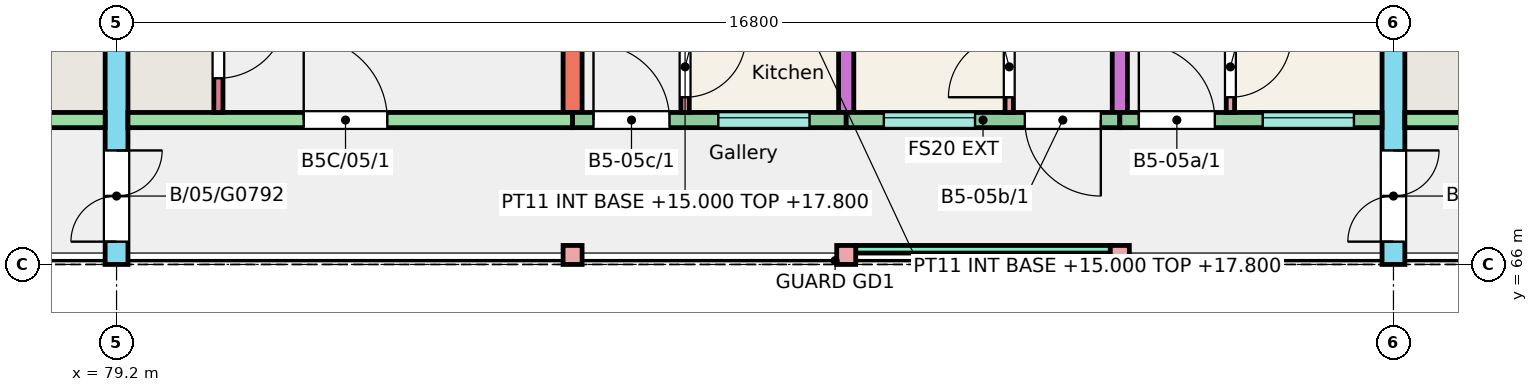
"""IFC4 building model, lengths in metres.
Left out: names, types, materials, properties, quantities, classifications, styles, units other than length and angle.
Written with IfcOpenShell. Run it as: python <this file> out.ifc"""

import sys

from ifc_helpers import new_model, si_unit, direction, frame, frame_2d, origin, origin_2d, place, context, subcontext, project, spatial, rectangle, extrude, element, fill, save


model = new_model("IFC4")
c1 = context("Model", 3, precision=1e-05, world=origin(), true_north=direction((0.0, 1.0)))
c2 = subcontext(c1, "Body", "Model", "MODEL_VIEW")
j1 = project(units=[si_unit("LENGTHUNIT", "METRE"), si_unit("PLANEANGLEUNIT", "RADIAN")], contexts=[c1])
p1 = place(None, origin())
s1 = spatial("IfcSite", under=j1, at=p1, CompositionType="ELEMENT")
p2 = place(p1, origin())
s2 = spatial("IfcBuilding", under=s1, at=p2, CompositionType="ELEMENT")
p3 = place(p2, frame((0.0, 0.0, 15.0)))
s3 = spatial("IfcBuildingStorey", under=s2, at=p3, CompositionType="ELEMENT", Elevation=15.0)
p4 = place(p3, frame((79.2, 66.0, 0.0), z_axis=(0.0, 0.0, 1.0), x_axis=(0.0, 1.0, 0.0)))
e1 = element("IfcWall", 1, at=p4, inside=s3, PredefinedType="SHEAR", context=c2, shape_type="SweptSolid", body=[
    extrude(rectangle(XDim=11.0, YDim=0.3, at=frame_2d((5.5, 0.0))), origin(), (0.0, 0.0, 1.0), 3.0),
])
p5 = place(p4, frame((0.3, 0.0, 0.0)))
e2 = element("IfcOpeningElement", 2, at=p5, cuts=e1, PredefinedType="OPENING", context=c2, shape_type="SweptSolid", body=[
    extrude(rectangle(XDim=1.2, YDim=2.1, at=frame_2d((0.6, 1.05))), frame((0.0, 0.16, 0.0), z_axis=(0.0, -1.0, 0.0), x_axis=(1.0, 0.0, 0.0)), (0.0, 0.0, 1.0), 0.32),
])
p6 = place(p3, frame((85.2, 68.0, 0.0), z_axis=(0.0, 0.0, 1.0), x_axis=(0.0, 1.0, 0.0)))
e3 = element("IfcWall", 3, at=p6, inside=s3, PredefinedType="SHEAR", context=c2, shape_type="SweptSolid", body=[
    extrude(rectangle(XDim=9.0, YDim=0.25, at=frame_2d((4.5, 0.0))), origin(), (0.0, 0.0, 1.0), 3.0),
])
for number, where, z_axis, x_axis in (
    (4, (88.8, 68.0, 0.0), (0.0, 0.0, 1.0), (0.0, 1.0, 0.0)),
    (5, (92.4, 68.0, 0.0), (0.0, 0.0, 1.0), (0.0, 1.0, 0.0)),
):
    element("IfcWall", number, at=place(p3, frame(where, z_axis=z_axis, x_axis=x_axis)), inside=s3, PredefinedType="SHEAR", context=c2, shape_type="SweptSolid", body=[
        extrude(rectangle(XDim=9.0, YDim=0.2, at=frame_2d((4.5, 0.0))), origin(), (0.0, 0.0, 1.0), 3.0),
    ])
p7 = place(p3, frame((96.0, 66.0, 0.0), z_axis=(0.0, 0.0, 1.0), x_axis=(0.0, 1.0, 0.0)))
e6 = element("IfcWall", 6, at=p7, inside=s3, PredefinedType="SHEAR", context=c2, shape_type="SweptSolid", body=[
    extrude(rectangle(XDim=11.0, YDim=0.3, at=frame_2d((5.5, 0.0))), origin(), (0.0, 0.0, 1.0), 3.0),
])
p8 = place(p7, frame((0.3, 0.0, 0.0)))
e7 = element("IfcOpeningElement", 7, at=p8, cuts=e6, PredefinedType="OPENING", context=c2, shape_type="SweptSolid", body=[
    extrude(rectangle(XDim=1.2, YDim=2.1, at=frame_2d((0.6, 1.05))), frame((0.0, 0.16, 0.0), z_axis=(0.0, -1.0, 0.0), x_axis=(1.0, 0.0, 0.0)), (0.0, 0.0, 1.0), 0.32),
])
p9 = place(p3, frame((73.2, 67.9, 0.0), z_axis=(0.0, 0.0, 1.0), x_axis=(1.0, 0.0, 0.0)))
e8 = element("IfcWall", 8, at=p9, inside=s3, PredefinedType="SHEAR", context=c2, shape_type="SweptSolid", body=[
    extrude(rectangle(XDim=5.85, YDim=0.2, at=frame_2d((2.925, 0.0))), origin(), (0.0, 0.0, 1.0), 3.0),
])
p10 = place(p9, frame((2.438, 0.0, 0.0)))
e9 = element("IfcOpeningElement", 9, at=p10, cuts=e8, PredefinedType="OPENING", context=c2, shape_type="SweptSolid", body=[
    extrude(rectangle(XDim=1.1, YDim=2.1, at=frame_2d((0.55, 1.05))), frame((0.0, 0.11, 0.0), z_axis=(0.0, -1.0, 0.0), x_axis=(1.0, 0.0, 0.0)), (0.0, 0.0, 1.0), 0.22),
])
p11 = place(p3, frame((79.35, 67.9, 0.0), z_axis=(0.0, 0.0, 1.0), x_axis=(1.0, 0.0, 0.0)))
e10 = element("IfcWall", 10, at=p11, inside=s3, PredefinedType="SHEAR", context=c2, shape_type="SweptSolid", body=[
    extrude(rectangle(XDim=5.85, YDim=0.2, at=frame_2d((2.925, 0.0))), origin(), (0.0, 0.0, 1.0), 3.0),
])
p12 = place(p11, frame((2.312, 0.0, 0.0)))
e11 = element("IfcOpeningElement", 11, at=p12, cuts=e10, PredefinedType="OPENING", context=c2, shape_type="SweptSolid", body=[
    extrude(rectangle(XDim=1.1, YDim=2.1, at=frame_2d((0.55, 1.05))), frame((0.0, 0.11, 0.0), z_axis=(0.0, -1.0, 0.0), x_axis=(1.0, 0.0, 0.0)), (0.0, 0.0, 1.0), 0.22),
])
p13 = place(p3, frame((80.54, 68.0, 0.0), z_axis=(0.0, 0.0, 1.0), x_axis=(0.0, 1.0, 0.0)))
e12 = element("IfcWall", 12, at=p13, inside=s3, PredefinedType="SHEAR", context=c2, shape_type="SweptSolid", body=[
    extrude(rectangle(XDim=1.72, YDim=0.12, at=frame_2d((0.86, 0.0))), origin(), (0.0, 0.0, 1.0), 3.0),
])
p14 = place(p13, frame((0.45, 0.0, 0.0)))
e13 = element("IfcOpeningElement", 13, at=p14, cuts=e12, PredefinedType="OPENING", context=c2, shape_type="SweptSolid", body=[
    extrude(rectangle(XDim=0.9, YDim=2.1, at=frame_2d((0.45, 1.05))), frame((0.0, 0.07, 0.0), z_axis=(0.0, -1.0, 0.0), x_axis=(1.0, 0.0, 0.0)), (0.0, 0.0, 1.0), 0.14),
])
p15 = place(p3, frame((85.2, 67.9, 0.0), z_axis=(0.0, 0.0, 1.0), x_axis=(1.0, 0.0, 0.0)))
e14 = element("IfcWall", 14, at=p15, inside=s3, PredefinedType="SOLIDWALL", context=c2, shape_type="SweptSolid", body=[
    extrude(rectangle(XDim=3.6, YDim=0.2, at=frame_2d((1.8, 0.0))), origin(), (0.0, 0.0, 1.0), 3.0),
])
p16 = place(p15, frame((1.917, 0.0, 1.1)))
e15 = element("IfcOpeningElement", 15, at=p16, cuts=e14, PredefinedType="OPENING", context=c2, shape_type="SweptSolid", body=[
    extrude(rectangle(XDim=1.2, YDim=1.3, at=frame_2d((0.6, 0.65))), frame((0.0, 0.11, 0.0), z_axis=(0.0, -1.0, 0.0), x_axis=(1.0, 0.0, 0.0)), (0.0, 0.0, 1.0), 0.22),
])
p17 = place(p15, frame((0.275, 0.0, 0.0)))
e16 = element("IfcOpeningElement", 16, at=p17, cuts=e14, PredefinedType="OPENING", context=c2, shape_type="SweptSolid", body=[
    extrude(rectangle(XDim=1.0, YDim=2.1, at=frame_2d((0.5, 1.05))), frame((0.0, 0.11, 0.0), z_axis=(0.0, -1.0, 0.0), x_axis=(1.0, 0.0, 0.0)), (0.0, 0.0, 1.0), 0.22),
])
p18 = place(p3, frame((88.8, 67.9, 0.0), z_axis=(0.0, 0.0, 1.0), x_axis=(1.0, 0.0, 0.0)))
e17 = element("IfcWall", 17, at=p18, inside=s3, PredefinedType="SOLIDWALL", context=c2, shape_type="SweptSolid", body=[
    extrude(rectangle(XDim=3.6, YDim=0.2, at=frame_2d((1.8, 0.0))), origin(), (0.0, 0.0, 1.0), 3.0),
])
p19 = place(p18, frame((0.495, 0.0, 1.1)))
e18 = element("IfcOpeningElement", 18, at=p19, cuts=e17, PredefinedType="OPENING", context=c2, shape_type="SweptSolid", body=[
    extrude(rectangle(XDim=1.2, YDim=1.3, at=frame_2d((0.6, 0.65))), frame((0.0, 0.11, 0.0), z_axis=(0.0, -1.0, 0.0), x_axis=(1.0, 0.0, 0.0)), (0.0, 0.0, 1.0), 0.22),
])
p20 = place(p18, frame((2.35, 0.0, 0.0)))
e19 = element("IfcOpeningElement", 19, at=p20, cuts=e17, PredefinedType="OPENING", context=c2, shape_type="SweptSolid", body=[
    extrude(rectangle(XDim=1.0, YDim=2.1, at=frame_2d((0.5, 1.05))), frame((0.0, 0.11, 0.0), z_axis=(0.0, -1.0, 0.0), x_axis=(1.0, 0.0, 0.0)), (0.0, 0.0, 1.0), 0.22),
])
p21 = place(p3, frame((92.4, 67.9, 0.0), z_axis=(0.0, 0.0, 1.0), x_axis=(1.0, 0.0, 0.0)))
e20 = element("IfcWall", 20, at=p21, inside=s3, PredefinedType="SOLIDWALL", context=c2, shape_type="SweptSolid", body=[
    extrude(rectangle(XDim=3.45, YDim=0.2, at=frame_2d((1.725, 0.0))), origin(), (0.0, 0.0, 1.0), 3.0),
])
p22 = place(p21, frame((1.88, 0.0, 1.1)))
e21 = element("IfcOpeningElement", 21, at=p22, cuts=e20, PredefinedType="OPENING", context=c2, shape_type="SweptSolid", body=[
    extrude(rectangle(XDim=1.2, YDim=1.3, at=frame_2d((0.6, 0.65))), frame((0.0, 0.11, 0.0), z_axis=(0.0, -1.0, 0.0), x_axis=(1.0, 0.0, 0.0)), (0.0, 0.0, 1.0), 0.22),
])
p23 = place(p21, frame((0.25, 0.0, 0.0)))
e22 = element("IfcOpeningElement", 22, at=p23, cuts=e20, PredefinedType="OPENING", context=c2, shape_type="SweptSolid", body=[
    extrude(rectangle(XDim=1.0, YDim=2.1, at=frame_2d((0.5, 1.05))), frame((0.0, 0.11, 0.0), z_axis=(0.0, -1.0, 0.0), x_axis=(1.0, 0.0, 0.0)), (0.0, 0.0, 1.0), 0.22),
])
p24 = place(p3, frame((96.15, 67.9, 0.0), z_axis=(0.0, 0.0, 1.0), x_axis=(1.0, 0.0, 0.0)))
e23 = element("IfcWall", 23, at=p24, inside=s3, PredefinedType="SHEAR", context=c2, shape_type="SweptSolid", body=[
    extrude(rectangle(XDim=5.85, YDim=0.2, at=frame_2d((2.925, 0.0))), origin(), (0.0, 0.0, 1.0), 3.0),
])
p25 = place(p24, frame((2.312, 0.0, 0.0)))
e24 = element("IfcOpeningElement", 24, at=p25, cuts=e23, PredefinedType="OPENING", context=c2, shape_type="SweptSolid", body=[
    extrude(rectangle(XDim=1.1, YDim=2.1, at=frame_2d((0.55, 1.05))), frame((0.0, 0.11, 0.0), z_axis=(0.0, -1.0, 0.0), x_axis=(1.0, 0.0, 0.0)), (0.0, 0.0, 1.0), 0.22),
])
for number, where, z_axis, x_axis in (
    (25, (85.2, 66.125, 0.0), (0.0, 0.0, 1.0), (1.0, 0.0, 0.0)),
    (26, (88.8, 66.125, 0.0), (0.0, 0.0, 1.0), (1.0, 0.0, 0.0)),
    (27, (92.4, 66.125, 0.0), (0.0, 0.0, 1.0), (1.0, 0.0, 0.0)),
):
    element("IfcColumn", number, at=place(p3, frame(where, z_axis=z_axis, x_axis=x_axis)), inside=s3, PredefinedType="COLUMN", context=c2, shape_type="SweptSolid", body=[
        extrude(rectangle(XDim=0.25, YDim=0.25, at=origin_2d()), origin(), (0.0, 0.0, 1.0), 3.0),
    ])
p26 = place(p3, frame((88.925, 66.2, 0.0), z_axis=(0.0, 0.0, 1.0), x_axis=(1.0, 0.0, 0.0)))
e28 = element("IfcWall", 28, at=p26, inside=s3, PredefinedType="SOLIDWALL", context=c2, shape_type="SweptSolid", body=[
    extrude(rectangle(XDim=3.35, YDim=0.1, at=frame_2d((1.675, 0.0))), origin(), (0.0, 0.0, 1.0), 2.45),
])
p27 = place(p3, frame((93.855, 68.0, 0.0), z_axis=(0.0, 0.0, 1.0), x_axis=(0.0, 1.0, 0.0)))
e29 = element("IfcWall", 29, at=p27, inside=s3, PredefinedType="PARTITIONING", context=c2, shape_type="SweptSolid", body=[
    extrude(rectangle(XDim=4.3, YDim=0.11, at=frame_2d((2.15, 0.0))), origin(), (0.0, 0.0, 1.0), 2.8),
])
p28 = place(p27, frame((0.2, 0.0, 0.0)))
e30 = element("IfcOpeningElement", 30, at=p28, cuts=e29, PredefinedType="OPENING", context=c2, shape_type="SweptSolid", body=[
    extrude(rectangle(XDim=0.8, YDim=2.1, at=frame_2d((0.4, 1.05))), frame((0.0, 0.065, 0.0), z_axis=(0.0, -1.0, 0.0), x_axis=(1.0, 0.0, 0.0)), (0.0, 0.0, 1.0), 0.13),
])
p29 = place(p27, frame((3.35, 0.0, 0.0)))
e31 = element("IfcOpeningElement", 31, at=p29, cuts=e29, PredefinedType="OPENING", context=c2, shape_type="SweptSolid", body=[
    extrude(rectangle(XDim=0.8, YDim=2.1, at=frame_2d((0.4, 1.05))), frame((0.0, 0.065, 0.0), z_axis=(0.0, -1.0, 0.0), x_axis=(1.0, 0.0, 0.0)), (0.0, 0.0, 1.0), 0.13),
])
p30 = place(p3, frame((90.945, 68.0, 0.0), z_axis=(0.0, 0.0, 1.0), x_axis=(0.0, 1.0, 0.0)))
e32 = element("IfcWall", 32, at=p30, inside=s3, PredefinedType="PARTITIONING", context=c2, shape_type="SweptSolid", body=[
    extrude(rectangle(XDim=4.3, YDim=0.11, at=frame_2d((2.15, 0.0))), origin(), (0.0, 0.0, 1.0), 2.8),
])
p31 = place(p30, frame((0.2, 0.0, 0.0)))
e33 = element("IfcOpeningElement", 33, at=p31, cuts=e32, PredefinedType="OPENING", context=c2, shape_type="SweptSolid", body=[
    extrude(rectangle(XDim=0.8, YDim=2.1, at=frame_2d((0.4, 1.05))), frame((0.0, 0.065, 0.0), z_axis=(0.0, -1.0, 0.0), x_axis=(1.0, 0.0, 0.0)), (0.0, 0.0, 1.0), 0.13),
])
p32 = place(p30, frame((3.35, 0.0, 0.0)))
e34 = element("IfcOpeningElement", 34, at=p32, cuts=e32, PredefinedType="OPENING", context=c2, shape_type="SweptSolid", body=[
    extrude(rectangle(XDim=0.8, YDim=2.1, at=frame_2d((0.4, 1.05))), frame((0.0, 0.065, 0.0), z_axis=(0.0, -1.0, 0.0), x_axis=(1.0, 0.0, 0.0)), (0.0, 0.0, 1.0), 0.13),
])
p33 = place(p3, frame((86.68, 68.0, 0.0), z_axis=(0.0, 0.0, 1.0), x_axis=(0.0, 1.0, 0.0)))
e35 = element("IfcWall", 35, at=p33, inside=s3, PredefinedType="PARTITIONING", context=c2, shape_type="SweptSolid", body=[
    extrude(rectangle(XDim=4.7, YDim=0.11, at=frame_2d((2.35, 0.0))), origin(), (0.0, 0.0, 1.0), 2.8),
])
p34 = place(p33, frame((0.2, 0.0, 0.0)))
e36 = element("IfcOpeningElement", 36, at=p34, cuts=e35, PredefinedType="OPENING", context=c2, shape_type="SweptSolid", body=[
    extrude(rectangle(XDim=0.8, YDim=2.1, at=frame_2d((0.4, 1.05))), frame((0.0, 0.065, 0.0), z_axis=(0.0, -1.0, 0.0), x_axis=(1.0, 0.0, 0.0)), (0.0, 0.0, 1.0), 0.13),
])
p35 = place(p33, frame((3.75, 0.0, 0.0)))
e37 = element("IfcOpeningElement", 37, at=p35, cuts=e35, PredefinedType="OPENING", context=c2, shape_type="SweptSolid", body=[
    extrude(rectangle(XDim=0.8, YDim=2.1, at=frame_2d((0.4, 1.05))), frame((0.0, 0.065, 0.0), z_axis=(0.0, -1.0, 0.0), x_axis=(1.0, 0.0, 0.0)), (0.0, 0.0, 1.0), 0.13),
])
p36 = place(p22, origin())
e38 = element("IfcWindow", 38, at=p36, inside=s3, PartitioningType="SINGLE_PANEL", PredefinedType="WINDOW", context=c2, shape_type="SweptSolid", body=[
    extrude(rectangle(XDim=1.2, YDim=1.3, at=frame_2d((0.6, 0.65))), frame((0.0, 0.06, 0.0), z_axis=(0.0, -1.0, 0.0), x_axis=(1.0, 0.0, 0.0)), (0.0, 0.0, 1.0), 0.06),
])
fill(e21, e38)
p37 = place(p19, origin())
e39 = element("IfcWindow", 39, at=p37, inside=s3, PartitioningType="SINGLE_PANEL", PredefinedType="WINDOW", context=c2, shape_type="SweptSolid", body=[
    extrude(rectangle(XDim=1.2, YDim=1.3, at=frame_2d((0.6, 0.65))), frame((0.0, 0.06, 0.0), z_axis=(0.0, -1.0, 0.0), x_axis=(1.0, 0.0, 0.0)), (0.0, 0.0, 1.0), 0.06),
])
fill(e18, e39)
p38 = place(p16, origin())
e40 = element("IfcWindow", 40, at=p38, inside=s3, PartitioningType="SINGLE_PANEL", PredefinedType="WINDOW", context=c2, shape_type="SweptSolid", body=[
    extrude(rectangle(XDim=1.2, YDim=1.3, at=frame_2d((0.6, 0.65))), frame((0.0, 0.06, 0.0), z_axis=(0.0, -1.0, 0.0), x_axis=(1.0, 0.0, 0.0)), (0.0, 0.0, 1.0), 0.06),
])
fill(e15, e40)
p39 = place(p23, origin())
e41 = element("IfcDoor", 41, at=p39, inside=s3, OperationType="SINGLE_SWING_LEFT", PredefinedType="DOOR", context=c2, shape_type="SweptSolid", body=[
    extrude(rectangle(XDim=1.0, YDim=2.1, at=frame_2d((0.5, 1.05))), frame((0.0, 0.025, 0.0), z_axis=(0.0, -1.0, 0.0), x_axis=(1.0, 0.0, 0.0)), (0.0, 0.0, 1.0), 0.05),
])
fill(e22, e41)
p40 = place(p28, origin())
e42 = element("IfcDoor", 42, at=p40, inside=s3, OperationType="SINGLE_SWING_RIGHT", PredefinedType="DOOR", context=c2, shape_type="SweptSolid", body=[
    extrude(rectangle(XDim=0.8, YDim=2.1, at=frame_2d((0.4, 1.05))), frame((0.0, 0.025, 0.0), z_axis=(0.0, -1.0, 0.0), x_axis=(1.0, 0.0, 0.0)), (0.0, 0.0, 1.0), 0.05),
])
fill(e30, e42)
p41 = place(p20, origin())
e43 = element("IfcDoor", 43, at=p41, inside=s3, OperationType="SINGLE_SWING_RIGHT", PredefinedType="DOOR", context=c2, shape_type="SweptSolid", body=[
    extrude(rectangle(XDim=1.0, YDim=2.1, at=frame_2d((0.5, 1.05))), frame((0.0, 0.025, 0.0), z_axis=(0.0, -1.0, 0.0), x_axis=(1.0, 0.0, 0.0)), (0.0, 0.0, 1.0), 0.05),
])
fill(e19, e43)
p42 = place(p31, origin())
e44 = element("IfcDoor", 44, at=p42, inside=s3, OperationType="SINGLE_SWING_LEFT", PredefinedType="DOOR", context=c2, shape_type="SweptSolid", body=[
    extrude(rectangle(XDim=0.8, YDim=2.1, at=frame_2d((0.4, 1.05))), frame((0.0, 0.025, 0.0), z_axis=(0.0, -1.0, 0.0), x_axis=(1.0, 0.0, 0.0)), (0.0, 0.0, 1.0), 0.05),
])
fill(e33, e44)
p43 = place(p17, origin())
e45 = element("IfcDoor", 45, at=p43, inside=s3, OperationType="SINGLE_SWING_LEFT", PredefinedType="DOOR", context=c2, shape_type="SweptSolid", body=[
    extrude(rectangle(XDim=1.0, YDim=2.1, at=frame_2d((0.5, 1.05))), frame((0.0, 0.025, 0.0), z_axis=(0.0, -1.0, 0.0), x_axis=(1.0, 0.0, 0.0)), (0.0, 0.0, 1.0), 0.05),
])
fill(e16, e45)
p44 = place(p34, origin())
e46 = element("IfcDoor", 46, at=p44, inside=s3, OperationType="SINGLE_SWING_RIGHT", PredefinedType="DOOR", context=c2, shape_type="SweptSolid", body=[
    extrude(rectangle(XDim=0.8, YDim=2.1, at=frame_2d((0.4, 1.05))), frame((0.0, 0.025, 0.0), z_axis=(0.0, -1.0, 0.0), x_axis=(1.0, 0.0, 0.0)), (0.0, 0.0, 1.0), 0.05),
])
fill(e36, e46)
p45 = place(p12, origin())
e47 = element("IfcDoor", 47, at=p45, inside=s3, OperationType="SINGLE_SWING_LEFT", PredefinedType="DOOR", context=c2, shape_type="SweptSolid", body=[
    extrude(rectangle(XDim=1.1, YDim=2.1, at=frame_2d((0.55, 1.05))), frame((0.0, 0.025, 0.0), z_axis=(0.0, -1.0, 0.0), x_axis=(1.0, 0.0, 0.0)), (0.0, 0.0, 1.0), 0.05),
])
fill(e11, e47)
p46 = place(p14, origin())
e48 = element("IfcDoor", 48, at=p46, inside=s3, OperationType="SINGLE_SWING_RIGHT", PredefinedType="DOOR", context=c2, shape_type="SweptSolid", body=[
    extrude(rectangle(XDim=0.9, YDim=2.1, at=frame_2d((0.45, 1.05))), frame((0.0, 0.025, 0.0), z_axis=(0.0, -1.0, 0.0), x_axis=(1.0, 0.0, 0.0)), (0.0, 0.0, 1.0), 0.05),
])
fill(e13, e48)
p47 = place(p5, origin())
e49 = element("IfcDoor", 49, at=p47, inside=s3, OperationType="DOUBLE_DOOR_SINGLE_SWING", PredefinedType="DOOR", context=c2, shape_type="SweptSolid", body=[
    extrude(rectangle(XDim=1.2, YDim=2.1, at=frame_2d((0.6, 1.05))), frame((0.0, 0.025, 0.0), z_axis=(0.0, -1.0, 0.0), x_axis=(1.0, 0.0, 0.0)), (0.0, 0.0, 1.0), 0.05),
])
fill(e2, e49)
p48 = place(p8, origin())
e50 = element("IfcDoor", 50, at=p48, inside=s3, OperationType="DOUBLE_DOOR_SINGLE_SWING", PredefinedType="DOOR", context=c2, shape_type="SweptSolid", body=[
    extrude(rectangle(XDim=1.2, YDim=2.1, at=frame_2d((0.6, 1.05))), frame((0.0, 0.025, 0.0), z_axis=(0.0, -1.0, 0.0), x_axis=(1.0, 0.0, 0.0)), (0.0, 0.0, 1.0), 0.05),
])
fill(e7, e50)
save(model, sys.argv[1])
